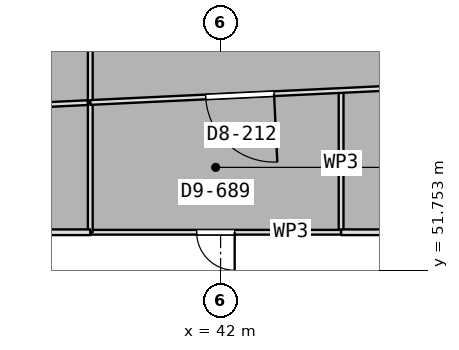
"""IFC4 building model, lengths in metres.
Left out: names, types, materials, properties, quantities, classifications, styles, units other than length and angle.
Written with IfcOpenShell. Run it as: python <this file> out.ifc"""

import sys

from ifc_helpers import new_model, si_unit, direction, frame, frame_2d, origin, place, context, subcontext, project, spatial, rectangle, extrude, element, fill, save


model = new_model("IFC4")
c1 = context("Model", 3, precision=1e-05, world=origin(), true_north=direction((0.0, 1.0)))
c2 = subcontext(c1, "Body", "Model", "MODEL_VIEW")
j1 = project(units=[si_unit("LENGTHUNIT", "METRE"), si_unit("PLANEANGLEUNIT", "RADIAN")], contexts=[c1])
p1 = place(None, origin())
s1 = spatial("IfcSite", under=j1, at=p1, CompositionType="ELEMENT")
p2 = place(p1, origin())
s2 = spatial("IfcBuilding", under=s1, at=p2, CompositionType="ELEMENT")
p3 = place(p2, frame((0.0, 0.0, 176.45)))
s3 = spatial("IfcBuildingStorey", under=s2, at=p3, CompositionType="ELEMENT", Elevation=176.45)
p4 = place(p3, frame((38.571, 56.165, 0.0), z_axis=(0.0, 0.0, 1.0), x_axis=(0.0, 1.0, 0.0)))
e1 = element("IfcWall", 1, at=p4, inside=s3, PredefinedType="PARTITIONING", context=c2, shape_type="SweptSolid", body=[
    extrude(rectangle(XDim=5.526, YDim=0.125, at=frame_2d((2.763, 0.0))), origin(), (0.0, 0.0, 1.0), 3.5),
])
p5 = place(p3, frame((46.383, 56.538, 0.0), z_axis=(0.0, 0.0, 1.0), x_axis=(-0.998861772529, -0.047698630803, 0.0)))
e2 = element("IfcWall", 2, at=p5, inside=s3, PredefinedType="PARTITIONING", context=c2, shape_type="SweptSolid", body=[
    extrude(rectangle(XDim=7.821, YDim=0.125, at=frame_2d((3.91, 0.0))), origin(), (0.0, 0.0, 1.0), 3.5),
])
p6 = place(p5, frame((2.98, 0.0, 0.0)))
e3 = element("IfcOpeningElement", 3, at=p6, cuts=e2, PredefinedType="OPENING", context=c2, shape_type="SweptSolid", body=[
    extrude(rectangle(XDim=1.8, YDim=2.1, at=frame_2d((0.9, 1.05))), frame((0.0, 0.073, 0.0), z_axis=(0.0, -1.0, 0.0), x_axis=(1.0, 0.0, 0.0)), (0.0, 0.0, 1.0), 0.145),
])
p7 = place(p3, frame((45.171, 56.418, 0.0), z_axis=(0.0, 0.0, 1.0), x_axis=(0.0, -1.0, 0.0)))
e4 = element("IfcWall", 4, at=p7, inside=s3, PredefinedType="PARTITIONING", context=c2, shape_type="SweptSolid", body=[
    extrude(rectangle(XDim=3.668, YDim=0.125, at=frame_2d((1.834, 0.0))), origin(), (0.0, 0.0, 1.0), 3.5),
])
p8 = place(p3, frame((45.171, 52.75, 0.0), z_axis=(0.0, 0.0, 1.0), x_axis=(-1.0, 0.0, 0.0)))
e5 = element("IfcWall", 5, at=p8, inside=s3, PredefinedType="PARTITIONING", context=c2, shape_type="SweptSolid", body=[
    extrude(rectangle(XDim=6.6, YDim=0.125, at=frame_2d((3.3, 0.0))), origin(), (0.0, 0.0, 1.0), 3.5),
])
p9 = place(p8, frame((2.8, 0.0, 0.0)))
e6 = element("IfcOpeningElement", 6, at=p9, cuts=e5, PredefinedType="OPENING", context=c2, shape_type="SweptSolid", body=[
    extrude(rectangle(XDim=1.0, YDim=2.1, at=frame_2d((0.5, 1.05))), frame((0.0, 0.073, 0.0), z_axis=(0.0, -1.0, 0.0), x_axis=(1.0, 0.0, 0.0)), (0.0, 0.0, 1.0), 0.145),
])
p10 = place(p3, frame((38.571, 52.75, 0.0), z_axis=(0.0, 0.0, 1.0), x_axis=(0.0, 1.0, 0.0)))
e7 = element("IfcWall", 7, at=p10, inside=s3, PredefinedType="PARTITIONING", context=c2, shape_type="SweptSolid", body=[
    extrude(rectangle(XDim=3.415, YDim=0.125, at=frame_2d((1.708, 0.0))), origin(), (0.0, 0.0, 1.0), 3.5),
])
p11 = place(p3, frame((53.955, 52.75, 0.0), z_axis=(0.0, 0.0, 1.0), x_axis=(-1.0, 0.0, 0.0)))
e8 = element("IfcWall", 8, at=p11, inside=s3, PredefinedType="PARTITIONING", context=c2, shape_type="SweptSolid", body=[
    extrude(rectangle(XDim=8.784, YDim=0.15, at=frame_2d((4.392, 0.0))), origin(), (0.0, 0.0, 1.0), 3.5),
])
p12 = place(p11, frame((3.892, 0.0, 0.0)))
e9 = element("IfcOpeningElement", 9, at=p12, cuts=e8, PredefinedType="OPENING", context=c2, shape_type="SweptSolid", body=[
    extrude(rectangle(XDim=1.0, YDim=2.1, at=frame_2d((0.5, 1.05))), frame((0.0, 0.085, 0.0), z_axis=(0.0, -1.0, 0.0), x_axis=(1.0, 0.0, 0.0)), (0.0, 0.0, 1.0), 0.17),
])
p13 = place(p3, frame((38.508, 56.161, 0.0), z_axis=(0.0, 0.0, 1.0), x_axis=(-0.998859754224, -0.047740877571, 0.0)))
e10 = element("IfcWall", 10, at=p13, inside=s3, PredefinedType="PARTITIONING", context=c2, shape_type="SweptSolid", body=[
    extrude(rectangle(XDim=7.855, YDim=0.125, at=frame_2d((3.927, 0.0))), origin(), (0.0, 0.0, 1.0), 3.5),
])
p14 = place(p13, frame((2.997, 0.0, 0.0)))
e11 = element("IfcOpeningElement", 11, at=p14, cuts=e10, PredefinedType="OPENING", context=c2, shape_type="SweptSolid", body=[
    extrude(rectangle(XDim=1.8, YDim=2.1, at=frame_2d((0.9, 1.05))), frame((0.0, 0.073, 0.0), z_axis=(0.0, -1.0, 0.0), x_axis=(1.0, 0.0, 0.0)), (0.0, 0.0, 1.0), 0.145),
])
p15 = place(p3, frame((38.57, 52.75, 0.0), z_axis=(0.0, 0.0, 1.0), x_axis=(-1.0, 0.0, 0.0)))
e12 = element("IfcWall", 12, at=p15, inside=s3, PredefinedType="PARTITIONING", context=c2, shape_type="SweptSolid", body=[
    extrude(rectangle(XDim=12.968, YDim=0.15, at=frame_2d((6.484, 0.0))), origin(), (0.0, 0.0, 1.0), 3.5),
])
p16 = place(p15, frame((5.984, 0.0, 0.0)))
e13 = element("IfcOpeningElement", 13, at=p16, cuts=e12, PredefinedType="OPENING", context=c2, shape_type="SweptSolid", body=[
    extrude(rectangle(XDim=1.0, YDim=2.1, at=frame_2d((0.5, 1.05))), frame((0.0, 0.085, 0.0), z_axis=(0.0, -1.0, 0.0), x_axis=(1.0, 0.0, 0.0)), (0.0, 0.0, 1.0), 0.17),
])
p17 = place(p9, origin())
e14 = element("IfcDoor", 14, at=p17, inside=s3, OperationType="SINGLE_SWING_LEFT", PredefinedType="DOOR", context=c2, shape_type="SweptSolid", body=[
    extrude(rectangle(XDim=1.0, YDim=2.1, at=frame_2d((0.5, 1.05))), frame((0.0, 0.025, 0.0), z_axis=(0.0, -1.0, 0.0), x_axis=(1.0, 0.0, 0.0)), (0.0, 0.0, 1.0), 0.05),
])
fill(e6, e14)
p18 = place(p6, origin())
e15 = element("IfcDoor", 15, at=p18, inside=s3, OperationType="DOUBLE_DOOR_SINGLE_SWING", PredefinedType="DOOR", context=c2, shape_type="SweptSolid", body=[
    extrude(rectangle(XDim=1.8, YDim=2.1, at=frame_2d((0.9, 1.05))), frame((0.0, 0.025, 0.0), z_axis=(0.0, -1.0, 0.0), x_axis=(1.0, 0.0, 0.0)), (0.0, 0.0, 1.0), 0.05),
])
fill(e3, e15)
save(model, sys.argv[1])
